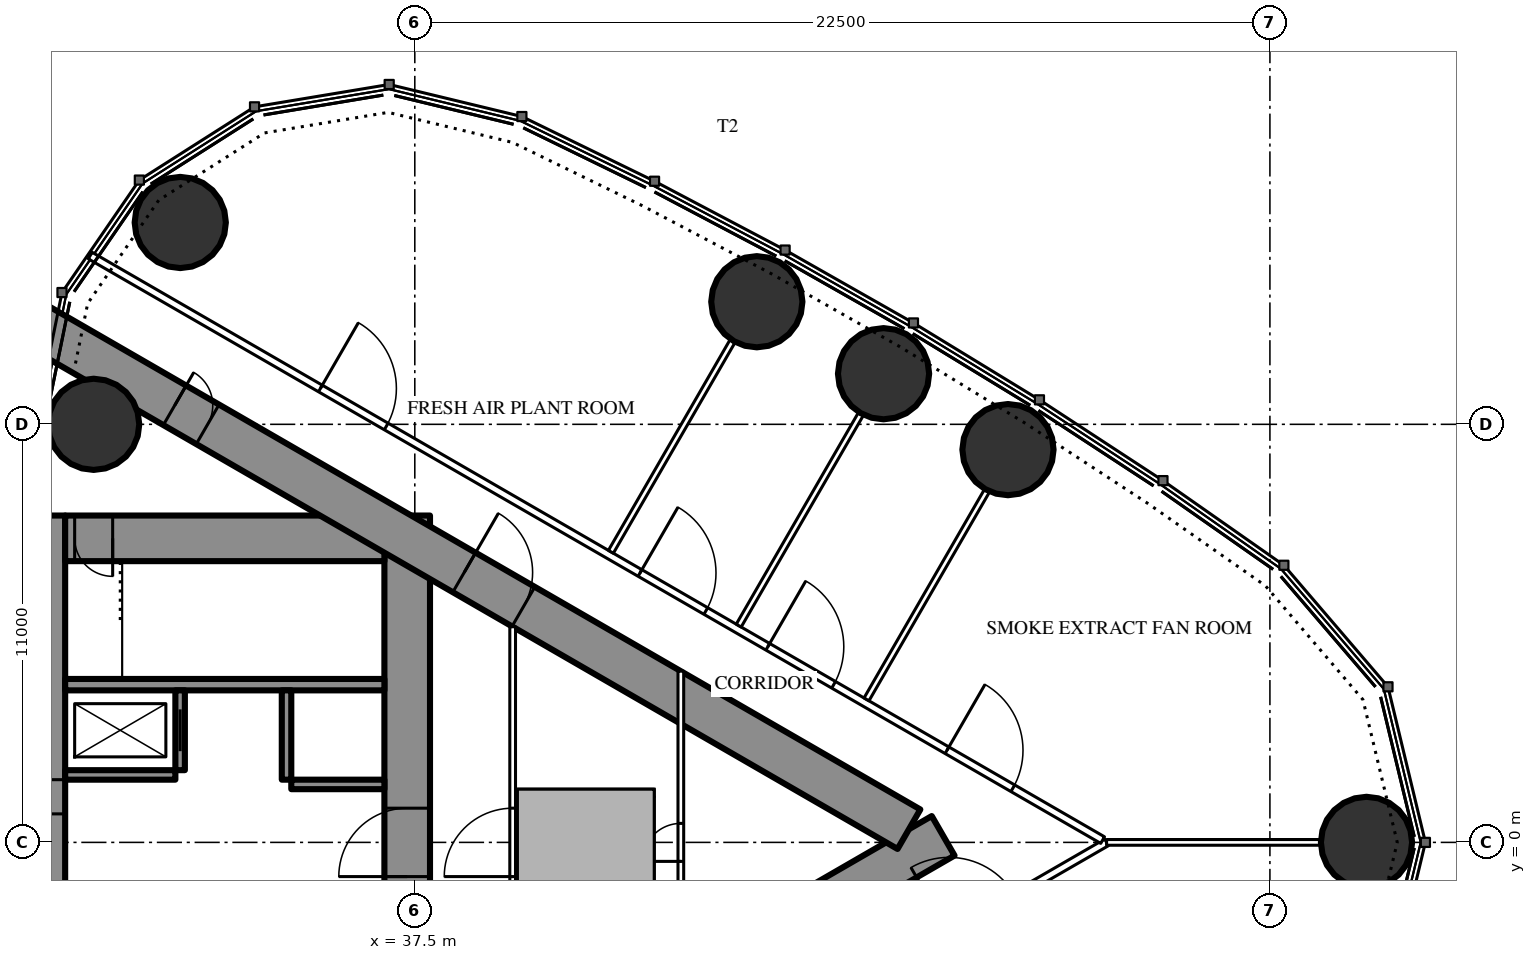
"""IFC4 building model, lengths in metres.
Left out: names, types, materials, properties, quantities, classifications, styles, units other than length and angle.
Written with IfcOpenShell. Run it as: python <this file> out.ifc"""

import sys

from ifc_helpers import new_model, si_unit, direction, frame, frame_2d, origin, origin_2d, place, context, subcontext, project, spatial, rectangle, circle, extrude, element, fill, save


model = new_model("IFC4")
c1 = context("Model", 3, precision=1e-05, world=origin(), true_north=direction((0.0, 1.0)))
c2 = subcontext(c1, "Body", "Model", "MODEL_VIEW")
j1 = project(units=[si_unit("LENGTHUNIT", "METRE"), si_unit("PLANEANGLEUNIT", "RADIAN")], contexts=[c1])
p1 = place(None, origin())
s1 = spatial("IfcSite", under=j1, at=p1, CompositionType="ELEMENT")
p2 = place(p1, origin())
s2 = spatial("IfcBuilding", under=s1, at=p2, CompositionType="ELEMENT")
p3 = place(p2, frame((0.0, 0.0, 268.3)))
s3 = spatial("IfcBuildingStorey", under=s2, at=p3, CompositionType="ELEMENT", Elevation=268.3)
for number, where, z_axis, x_axis in (
    (1, (62.542, 0.0, 0.0), (0.0, 0.0, 1.0), (1.0, 0.0, 0.0)),
    (2, (31.328, 16.311, 0.0), (0.0, 0.0, 1.0), (1.0, 0.0, 0.0)),
    (3, (29.05, 11.0, 0.0), (0.0, 0.0, 1.0), (1.0, 0.0, 0.0)),
    (4, (53.108, 10.334, 0.0), (0.0, 0.0, 1.0), (1.0, 0.0, 0.0)),
    (5, (49.834, 12.332, 0.0), (0.0, 0.0, 1.0), (1.0, 0.0, 0.0)),
    (6, (46.499, 14.226, 0.0), (0.0, 0.0, 1.0), (1.0, 0.0, 0.0)),
):
    element("IfcColumn", number, at=place(p3, frame(where, z_axis=z_axis, x_axis=x_axis)), inside=s3, PredefinedType="COLUMN", context=c2, shape_type="SweptSolid", body=[
        extrude(circle(Radius=1.2, at=origin_2d()), origin(), (0.0, 0.0, 1.0), 5.0),
    ])
p4 = place(p3, frame((27.9, -8.6, 0.0), z_axis=(0.0, 0.0, 1.0), x_axis=(0.0, 1.0, 0.0)))
e7 = element("IfcWall", 7, at=p4, inside=s3, PredefinedType="SHEAR", context=c2, shape_type="SweptSolid", body=[
    extrude(rectangle(XDim=17.2, YDim=0.8, at=frame_2d((8.6, 0.0))), origin(), (0.0, 0.0, 1.0), 5.0),
])
p5 = place(p4, frame((9.35, 0.0, 0.0)))
e8 = element("IfcOpeningElement", 8, at=p5, cuts=e7, PredefinedType="OPENING", context=c2, shape_type="SweptSolid", body=[
    extrude(rectangle(XDim=0.9, YDim=2.2, at=frame_2d((0.45, 1.1))), frame((0.0, 0.41, 0.0), z_axis=(0.0, -1.0, 0.0), x_axis=(1.0, 0.0, 0.0)), (0.0, 0.0, 1.0), 0.82),
])
p6 = place(p3, frame((37.3, -8.6, 0.0), z_axis=(0.0, 0.0, 1.0), x_axis=(0.0, 1.0, 0.0)))
e9 = element("IfcWall", 9, at=p6, inside=s3, PredefinedType="SHEAR", context=c2, shape_type="SweptSolid", body=[
    extrude(rectangle(XDim=17.2, YDim=1.2, at=frame_2d((8.6, 0.0))), origin(), (0.0, 0.0, 1.0), 5.0),
])
p7 = place(p6, frame((7.7, 0.0, 0.0)))
e10 = element("IfcOpeningElement", 10, at=p7, cuts=e9, PredefinedType="OPENING", context=c2, shape_type="SweptSolid", body=[
    extrude(rectangle(XDim=1.8, YDim=2.2, at=frame_2d((0.9, 1.1))), frame((0.0, 0.61, 0.0), z_axis=(0.0, -1.0, 0.0), x_axis=(1.0, 0.0, 0.0)), (0.0, 0.0, 1.0), 1.22),
])
p8 = place(p3, frame((28.3, 8.0, 0.0), z_axis=(0.0, 0.0, 1.0), x_axis=(1.0, 0.0, 0.0)))
e11 = element("IfcWall", 11, at=p8, inside=s3, PredefinedType="SHEAR", context=c2, shape_type="SweptSolid", body=[
    extrude(rectangle(XDim=8.4, YDim=1.2, at=frame_2d((4.2, 0.0))), origin(), (0.0, 0.0, 1.0), 5.0),
])
p9 = place(p8, frame((0.25, 0.0, 0.0)))
e12 = element("IfcOpeningElement", 12, at=p9, cuts=e11, PredefinedType="OPENING", context=c2, shape_type="SweptSolid", body=[
    extrude(rectangle(XDim=1.0, YDim=2.2, at=frame_2d((0.5, 1.1))), frame((0.0, 0.61, 0.0), z_axis=(0.0, -1.0, 0.0), x_axis=(1.0, 0.0, 0.0)), (0.0, 0.0, 1.0), 1.22),
])
p10 = place(p3, frame((28.3, 4.15, 0.0), z_axis=(0.0, 0.0, 1.0), x_axis=(1.0, 0.0, 0.0)))
e13 = element("IfcWall", 13, at=p10, inside=s3, PredefinedType="SHEAR", context=c2, shape_type="SweptSolid", body=[
    extrude(rectangle(XDim=8.4, YDim=0.3, at=frame_2d((4.2, 0.0))), origin(), (0.0, 0.0, 1.0), 5.0),
])
p11 = place(p3, frame((31.325, 1.9, 0.0), z_axis=(0.0, 0.0, 1.0), x_axis=(0.0, 1.0, 0.0)))
e14 = element("IfcWall", 14, at=p11, inside=s3, PredefinedType="SHEAR", context=c2, shape_type="SweptSolid", body=[
    extrude(rectangle(XDim=2.1, YDim=0.25, at=frame_2d((1.05, 0.0))), origin(), (0.0, 0.0, 1.0), 5.0),
])
p12 = place(p11, frame((0.5, 0.0, 0.0)))
e15 = element("IfcOpeningElement", 15, at=p12, cuts=e14, PredefinedType="OPENING", context=c2, shape_type="SweptSolid", body=[
    extrude(rectangle(XDim=1.1, YDim=2.2, at=frame_2d((0.55, 1.1))), frame((0.0, 0.135, 0.0), z_axis=(0.0, -1.0, 0.0), x_axis=(1.0, 0.0, 0.0)), (0.0, 0.0, 1.0), 0.27),
])
p13 = place(p3, frame((34.125, 1.65, 0.0), z_axis=(0.0, 0.0, 1.0), x_axis=(0.0, 1.0, 0.0)))
e16 = element("IfcWall", 16, at=p13, inside=s3, PredefinedType="SHEAR", context=c2, shape_type="SweptSolid", body=[
    extrude(rectangle(XDim=2.35, YDim=0.25, at=frame_2d((1.175, 0.0))), origin(), (0.0, 0.0, 1.0), 5.0),
])
p14 = place(p3, frame((28.3, 1.775, 0.0), z_axis=(0.0, 0.0, 1.0), x_axis=(1.0, 0.0, 0.0)))
e17 = element("IfcWall", 17, at=p14, inside=s3, PredefinedType="SHEAR", context=c2, shape_type="SweptSolid", body=[
    extrude(rectangle(XDim=2.9, YDim=0.25, at=frame_2d((1.45, 0.0))), origin(), (0.0, 0.0, 1.0), 5.0),
])
p15 = place(p3, frame((34.25, 1.525, 0.0), z_axis=(0.0, 0.0, 1.0), x_axis=(1.0, 0.0, 0.0)))
e18 = element("IfcWall", 18, at=p15, inside=s3, PredefinedType="SHEAR", context=c2, shape_type="SweptSolid", body=[
    extrude(rectangle(XDim=2.45, YDim=0.25, at=frame_2d((1.225, 0.0))), origin(), (0.0, 0.0, 1.0), 5.0),
])
p16 = place(p3, frame((27.2, -13.8, 0.0), z_axis=(0.0, 0.0, 1.0), x_axis=(0.866027159892, 0.499996958321, 0.0)))
e19 = element("IfcWall", 19, at=p16, inside=s3, PredefinedType="SHEAR", context=c2, shape_type="SweptSolid", body=[
    extrude(rectangle(XDim=27.947, YDim=1.2, at=frame_2d((13.973, 0.0))), origin(), (0.0, 0.0, 1.0), 5.0),
])
p17 = place(p16, frame((4.6, 0.0, 0.0)))
e20 = element("IfcOpeningElement", 20, at=p17, cuts=e19, PredefinedType="OPENING", context=c2, shape_type="SweptSolid", body=[
    extrude(rectangle(XDim=1.0, YDim=2.2, at=frame_2d((0.5, 1.1))), frame((0.0, 0.61, 0.0), z_axis=(0.0, -1.0, 0.0), x_axis=(1.0, 0.0, 0.0)), (0.0, 0.0, 1.0), 1.22),
])
p18 = place(p16, frame((13.395, 0.0, 0.0)))
e21 = element("IfcOpeningElement", 21, at=p18, cuts=e19, PredefinedType="OPENING", context=c2, shape_type="SweptSolid", body=[
    extrude(rectangle(XDim=1.8, YDim=2.2, at=frame_2d((0.9, 1.1))), frame((0.0, 0.61, 0.0), z_axis=(0.0, -1.0, 0.0), x_axis=(1.0, 0.0, 0.0)), (0.0, 0.0, 1.0), 1.22),
])
p19 = place(p3, frame((27.2, 13.8, 0.0), z_axis=(0.0, 0.0, 1.0), x_axis=(0.866024515034, -0.500001539357, 0.0)))
e22 = element("IfcWall", 22, at=p19, inside=s3, PredefinedType="SHEAR", context=c2, shape_type="SweptSolid", body=[
    extrude(rectangle(XDim=26.907, YDim=1.2, at=frame_2d((13.454, 0.0))), origin(), (0.0, 0.0, 1.0), 5.0),
])
p20 = place(p19, frame((4.6, 0.0, 0.0)))
e23 = element("IfcOpeningElement", 23, at=p20, cuts=e22, PredefinedType="OPENING", context=c2, shape_type="SweptSolid", body=[
    extrude(rectangle(XDim=1.0, YDim=2.2, at=frame_2d((0.5, 1.1))), frame((0.0, 0.61, 0.0), z_axis=(0.0, -1.0, 0.0), x_axis=(1.0, 0.0, 0.0)), (0.0, 0.0, 1.0), 1.22),
])
p21 = place(p19, frame((13.395, 0.0, 0.0)))
e24 = element("IfcOpeningElement", 24, at=p21, cuts=e22, PredefinedType="OPENING", context=c2, shape_type="SweptSolid", body=[
    extrude(rectangle(XDim=1.8, YDim=2.2, at=frame_2d((0.9, 1.1))), frame((0.0, 0.61, 0.0), z_axis=(0.0, -1.0, 0.0), x_axis=(1.0, 0.0, 0.0)), (0.0, 0.0, 1.0), 1.22),
])
p22 = place(p3, frame((43.8, 1.3, 5.0), z_axis=(0.0, 0.0, 1.0), x_axis=(-1.0, 0.0, 0.0)))
e25 = element("IfcWall", 25, at=p22, inside=s3, PredefinedType="SOLIDWALL", context=c2, shape_type="SweptSolid", body=[
    extrude(rectangle(XDim=3.6, YDim=0.2, at=frame_2d((1.8, 0.0))), origin(), (0.0, 0.0, 1.0), 2.6),
])
p23 = place(p3, frame((40.3, 1.2, 5.0), z_axis=(0.0, 0.0, 1.0), x_axis=(0.0, -1.0, 0.0)))
e26 = element("IfcWall", 26, at=p23, inside=s3, PredefinedType="SOLIDWALL", context=c2, shape_type="SweptSolid", body=[
    extrude(rectangle(XDim=2.4, YDim=0.2, at=frame_2d((1.2, 0.0))), origin(), (0.0, 0.0, 1.0), 2.6),
])
p24 = place(p23, frame((0.7, 0.0, 0.0)))
e27 = element("IfcOpeningElement", 27, at=p24, cuts=e26, PredefinedType="OPENING", context=c2, shape_type="SweptSolid", body=[
    extrude(rectangle(XDim=1.0, YDim=2.2, at=frame_2d((0.5, 1.1))), frame((0.0, 0.11, 0.0), z_axis=(0.0, -1.0, 0.0), x_axis=(1.0, 0.0, 0.0)), (0.0, 0.0, 1.0), 0.22),
])
p25 = place(p3, frame((43.7, -1.2, 5.0), z_axis=(0.0, 0.0, 1.0), x_axis=(0.0, 1.0, 0.0)))
e28 = element("IfcWall", 28, at=p25, inside=s3, PredefinedType="SOLIDWALL", context=c2, shape_type="SweptSolid", body=[
    extrude(rectangle(XDim=2.4, YDim=0.2, at=frame_2d((1.2, 0.0))), origin(), (0.0, 0.0, 1.0), 2.6),
])
p26 = place(p3, frame((28.959, -15.44, 0.0), z_axis=(0.0, 0.0, 1.0), x_axis=(0.866025227435, 0.500000305447, 0.0)))
e29 = element("IfcWall", 29, at=p26, inside=s3, PredefinedType="PARTITIONING", context=c2, shape_type="SweptSolid", body=[
    extrude(rectangle(XDim=30.88, YDim=0.2, at=frame_2d((15.44, 0.0))), origin(), (0.0, 0.0, 1.0), 4.7),
])
p27 = place(p26, frame((6.994, 0.0, 0.0)))
e30 = element("IfcOpeningElement", 30, at=p27, cuts=e29, PredefinedType="OPENING", context=c2, shape_type="SweptSolid", body=[
    extrude(rectangle(XDim=2.0, YDim=2.4, at=frame_2d((1.0, 1.2))), frame((0.0, 0.11, 0.0), z_axis=(0.0, -1.0, 0.0), x_axis=(1.0, 0.0, 0.0)), (0.0, 0.0, 1.0), 0.22),
])
p28 = place(p26, frame((16.704, 0.0, 0.0)))
e31 = element("IfcOpeningElement", 31, at=p28, cuts=e29, PredefinedType="OPENING", context=c2, shape_type="SweptSolid", body=[
    extrude(rectangle(XDim=2.0, YDim=2.4, at=frame_2d((1.0, 1.2))), frame((0.0, 0.11, 0.0), z_axis=(0.0, -1.0, 0.0), x_axis=(1.0, 0.0, 0.0)), (0.0, 0.0, 1.0), 0.22),
])
p29 = place(p26, frame((20.587, 0.0, 0.0)))
e32 = element("IfcOpeningElement", 32, at=p29, cuts=e29, PredefinedType="OPENING", context=c2, shape_type="SweptSolid", body=[
    extrude(rectangle(XDim=2.0, YDim=2.4, at=frame_2d((1.0, 1.2))), frame((0.0, 0.11, 0.0), z_axis=(0.0, -1.0, 0.0), x_axis=(1.0, 0.0, 0.0)), (0.0, 0.0, 1.0), 0.22),
])
p30 = place(p26, frame((26.092, 0.0, 0.0)))
e33 = element("IfcOpeningElement", 33, at=p30, cuts=e29, PredefinedType="OPENING", context=c2, shape_type="SweptSolid", body=[
    extrude(rectangle(XDim=2.0, YDim=2.4, at=frame_2d((1.0, 1.2))), frame((0.0, 0.11, 0.0), z_axis=(0.0, -1.0, 0.0), x_axis=(1.0, 0.0, 0.0)), (0.0, 0.0, 1.0), 0.22),
])
p31 = place(p3, frame((28.959, 15.44, 0.0), z_axis=(0.0, 0.0, 1.0), x_axis=(0.866027378611, -0.499996579484, 0.0)))
e34 = element("IfcWall", 34, at=p31, inside=s3, PredefinedType="PARTITIONING", context=c2, shape_type="SweptSolid", body=[
    extrude(rectangle(XDim=30.76, YDim=0.2, at=frame_2d((15.38, 0.0))), origin(), (0.0, 0.0, 1.0), 4.7),
])
p32 = place(p31, frame((26.032, 0.0, 0.0)))
e35 = element("IfcOpeningElement", 35, at=p32, cuts=e34, PredefinedType="OPENING", context=c2, shape_type="SweptSolid", body=[
    extrude(rectangle(XDim=2.0, YDim=2.4, at=frame_2d((1.0, 1.2))), frame((0.0, 0.11, 0.0), z_axis=(0.0, -1.0, 0.0), x_axis=(1.0, 0.0, 0.0)), (0.0, 0.0, 1.0), 0.22),
])
p33 = place(p31, frame((20.587, 0.0, 0.0)))
e36 = element("IfcOpeningElement", 36, at=p33, cuts=e34, PredefinedType="OPENING", context=c2, shape_type="SweptSolid", body=[
    extrude(rectangle(XDim=2.0, YDim=2.4, at=frame_2d((1.0, 1.2))), frame((0.0, 0.11, 0.0), z_axis=(0.0, -1.0, 0.0), x_axis=(1.0, 0.0, 0.0)), (0.0, 0.0, 1.0), 0.22),
])
p34 = place(p31, frame((16.704, 0.0, 0.0)))
e37 = element("IfcOpeningElement", 37, at=p34, cuts=e34, PredefinedType="OPENING", context=c2, shape_type="SweptSolid", body=[
    extrude(rectangle(XDim=2.0, YDim=2.4, at=frame_2d((1.0, 1.2))), frame((0.0, 0.11, 0.0), z_axis=(0.0, -1.0, 0.0), x_axis=(1.0, 0.0, 0.0)), (0.0, 0.0, 1.0), 0.22),
])
p35 = place(p31, frame((6.994, 0.0, 0.0)))
e38 = element("IfcOpeningElement", 38, at=p35, cuts=e34, PredefinedType="OPENING", context=c2, shape_type="SweptSolid", body=[
    extrude(rectangle(XDim=2.0, YDim=2.4, at=frame_2d((1.0, 1.2))), frame((0.0, 0.11, 0.0), z_axis=(0.0, -1.0, 0.0), x_axis=(1.0, 0.0, 0.0)), (0.0, 0.0, 1.0), 0.22),
])
p36 = place(p3, frame((42.66, 7.646, 0.0), z_axis=(0.0, 0.0, 1.0), x_axis=(0.499996592859, 0.866027370889, 0.0)))
e39 = element("IfcWall", 39, at=p36, inside=s3, PredefinedType="PARTITIONING", context=c2, shape_type="SweptSolid", body=[
    extrude(rectangle(XDim=6.398, YDim=0.15, at=frame_2d((3.199, 0.0))), origin(), (0.0, 0.0, 1.0), 3.8),
])
p37 = place(p3, frame((46.023, 5.704, 0.0), z_axis=(0.0, 0.0, 1.0), x_axis=(0.499984478165, 0.866034365135, 0.0)))
e40 = element("IfcWall", 40, at=p37, inside=s3, PredefinedType="PARTITIONING", context=c2, shape_type="SweptSolid", body=[
    extrude(rectangle(XDim=6.426, YDim=0.15, at=frame_2d((3.213, 0.0))), origin(), (0.0, 0.0, 1.0), 3.8),
])
p38 = place(p3, frame((49.385, 3.763, 0.0), z_axis=(0.0, 0.0, 1.0), x_axis=(0.499999447814, 0.866025722589, 0.0)))
e41 = element("IfcWall", 41, at=p38, inside=s3, PredefinedType="PARTITIONING", context=c2, shape_type="SweptSolid", body=[
    extrude(rectangle(XDim=6.333, YDim=0.15, at=frame_2d((3.166, 0.0))), origin(), (0.0, 0.0, 1.0), 3.8),
])
p39 = place(p3, frame((55.702, 0.0, 0.0), z_axis=(0.0, 0.0, 1.0), x_axis=(1.0, 0.0, 0.0)))
e42 = element("IfcWall", 42, at=p39, inside=s3, PredefinedType="PARTITIONING", context=c2, shape_type="SweptSolid", body=[
    extrude(rectangle(XDim=5.619, YDim=0.15, at=frame_2d((2.81, 0.0))), origin(), (0.0, 0.0, 1.0), 3.8),
])
p40 = place(p3, frame((40.075, -5.674, 0.0), z_axis=(0.0, 0.0, 1.0), x_axis=(0.0, 1.0, 0.0)))
e43 = element("IfcWall", 43, at=p40, inside=s3, PredefinedType="PARTITIONING", context=c2, shape_type="SweptSolid", body=[
    extrude(rectangle(XDim=11.348, YDim=0.15, at=frame_2d((5.674, 0.0))), origin(), (0.0, 0.0, 1.0), 4.7),
])
p41 = place(p40, frame((4.774, 0.0, 0.0)))
e44 = element("IfcOpeningElement", 44, at=p41, cuts=e43, PredefinedType="OPENING", context=c2, shape_type="SweptSolid", body=[
    extrude(rectangle(XDim=1.8, YDim=2.2, at=frame_2d((0.9, 1.1))), frame((0.0, 0.085, 0.0), z_axis=(0.0, -1.0, 0.0), x_axis=(1.0, 0.0, 0.0)), (0.0, 0.0, 1.0), 0.17),
])
p42 = place(p3, frame((44.5, -4.505, 0.0), z_axis=(0.0, 0.0, 1.0), x_axis=(0.0, 1.0, 0.0)))
e45 = element("IfcWall", 45, at=p42, inside=s3, PredefinedType="PARTITIONING", context=c2, shape_type="SweptSolid", body=[
    extrude(rectangle(XDim=9.009, YDim=0.15, at=frame_2d((4.505, 0.0))), origin(), (0.0, 0.0, 1.0), 4.7),
])
p43 = place(p42, frame((4.005, 0.0, 0.0)))
e46 = element("IfcOpeningElement", 46, at=p43, cuts=e45, PredefinedType="OPENING", context=c2, shape_type="SweptSolid", body=[
    extrude(rectangle(XDim=1.0, YDim=2.2, at=frame_2d((0.5, 1.1))), frame((0.0, 0.085, 0.0), z_axis=(0.0, -1.0, 0.0), x_axis=(1.0, 0.0, 0.0)), (0.0, 0.0, 1.0), 0.17),
])
p44 = place(p24, origin())
e47 = element("IfcDoor", 47, at=p44, inside=s3, OperationType="SINGLE_SWING_LEFT", PredefinedType="DOOR", context=c2, shape_type="SweptSolid", body=[
    extrude(rectangle(XDim=1.0, YDim=2.2, at=frame_2d((0.5, 1.1))), frame((0.0, 0.025, 0.0), z_axis=(0.0, -1.0, 0.0), x_axis=(1.0, 0.0, 0.0)), (0.0, 0.0, 1.0), 0.05),
])
fill(e27, e47)
p45 = place(p32, origin())
e48 = element("IfcDoor", 48, at=p45, inside=s3, OperationType="DOUBLE_DOOR_SINGLE_SWING", PredefinedType="DOOR", context=c2, shape_type="SweptSolid", body=[
    extrude(rectangle(XDim=2.0, YDim=2.4, at=frame_2d((1.0, 1.2))), frame((0.0, 0.025, 0.0), z_axis=(0.0, -1.0, 0.0), x_axis=(1.0, 0.0, 0.0)), (0.0, 0.0, 1.0), 0.05),
])
fill(e35, e48)
p46 = place(p33, origin())
e49 = element("IfcDoor", 49, at=p46, inside=s3, OperationType="DOUBLE_DOOR_SINGLE_SWING", PredefinedType="DOOR", context=c2, shape_type="SweptSolid", body=[
    extrude(rectangle(XDim=2.0, YDim=2.4, at=frame_2d((1.0, 1.2))), frame((0.0, 0.025, 0.0), z_axis=(0.0, -1.0, 0.0), x_axis=(1.0, 0.0, 0.0)), (0.0, 0.0, 1.0), 0.05),
])
fill(e36, e49)
p47 = place(p34, origin())
e50 = element("IfcDoor", 50, at=p47, inside=s3, OperationType="DOUBLE_DOOR_SINGLE_SWING", PredefinedType="DOOR", context=c2, shape_type="SweptSolid", body=[
    extrude(rectangle(XDim=2.0, YDim=2.4, at=frame_2d((1.0, 1.2))), frame((0.0, 0.025, 0.0), z_axis=(0.0, -1.0, 0.0), x_axis=(1.0, 0.0, 0.0)), (0.0, 0.0, 1.0), 0.05),
])
fill(e37, e50)
p48 = place(p35, origin())
e51 = element("IfcDoor", 51, at=p48, inside=s3, OperationType="DOUBLE_DOOR_SINGLE_SWING", PredefinedType="DOOR", context=c2, shape_type="SweptSolid", body=[
    extrude(rectangle(XDim=2.0, YDim=2.4, at=frame_2d((1.0, 1.2))), frame((0.0, 0.025, 0.0), z_axis=(0.0, -1.0, 0.0), x_axis=(1.0, 0.0, 0.0)), (0.0, 0.0, 1.0), 0.05),
])
fill(e38, e51)
p49 = place(p41, origin())
e52 = element("IfcDoor", 52, at=p49, inside=s3, OperationType="DOUBLE_DOOR_SINGLE_SWING", PredefinedType="DOOR", context=c2, shape_type="SweptSolid", body=[
    extrude(rectangle(XDim=1.8, YDim=2.2, at=frame_2d((0.9, 1.1))), frame((0.0, 0.025, 0.0), z_axis=(0.0, -1.0, 0.0), x_axis=(1.0, 0.0, 0.0)), (0.0, 0.0, 1.0), 0.05),
])
fill(e44, e52)
p50 = place(p43, origin())
e53 = element("IfcDoor", 53, at=p50, inside=s3, OperationType="SINGLE_SWING_LEFT", PredefinedType="DOOR", context=c2, shape_type="SweptSolid", body=[
    extrude(rectangle(XDim=1.0, YDim=2.2, at=frame_2d((0.5, 1.1))), frame((0.0, 0.025, 0.0), z_axis=(0.0, -1.0, 0.0), x_axis=(1.0, 0.0, 0.0)), (0.0, 0.0, 1.0), 0.05),
])
fill(e46, e53)
p51 = place(p20, origin())
e54 = element("IfcDoor", 54, at=p51, inside=s3, OperationType="SINGLE_SWING_LEFT", PredefinedType="DOOR", context=c2, shape_type="SweptSolid", body=[
    extrude(rectangle(XDim=1.0, YDim=2.2, at=frame_2d((0.5, 1.1))), frame((0.0, 0.025, 0.0), z_axis=(0.0, -1.0, 0.0), x_axis=(1.0, 0.0, 0.0)), (0.0, 0.0, 1.0), 0.05),
])
fill(e23, e54)
p52 = place(p21, origin())
e55 = element("IfcDoor", 55, at=p52, inside=s3, OperationType="DOUBLE_DOOR_SINGLE_SWING", PredefinedType="DOOR", context=c2, shape_type="SweptSolid", body=[
    extrude(rectangle(XDim=1.8, YDim=2.2, at=frame_2d((0.9, 1.1))), frame((0.0, 0.025, 0.0), z_axis=(0.0, -1.0, 0.0), x_axis=(1.0, 0.0, 0.0)), (0.0, 0.0, 1.0), 0.05),
])
fill(e24, e55)
p53 = place(p7, origin())
e56 = element("IfcDoor", 56, at=p53, inside=s3, OperationType="DOUBLE_DOOR_SINGLE_SWING", PredefinedType="DOOR", context=c2, shape_type="SweptSolid", body=[
    extrude(rectangle(XDim=1.8, YDim=2.2, at=frame_2d((0.9, 1.1))), frame((0.0, 0.025, 0.0), z_axis=(0.0, -1.0, 0.0), x_axis=(1.0, 0.0, 0.0)), (0.0, 0.0, 1.0), 0.05),
])
fill(e10, e56)
p54 = place(p9, origin())
e57 = element("IfcDoor", 57, at=p54, inside=s3, OperationType="SINGLE_SWING_RIGHT", PredefinedType="DOOR", context=c2, shape_type="SweptSolid", body=[
    extrude(rectangle(XDim=1.0, YDim=2.2, at=frame_2d((0.5, 1.1))), frame((0.0, 0.025, 0.0), z_axis=(0.0, -1.0, 0.0), x_axis=(1.0, 0.0, 0.0)), (0.0, 0.0, 1.0), 0.05),
])
fill(e12, e57)
p55 = place(p12, origin())
e58 = element("IfcDoor", 58, at=p55, inside=s3, OperationType="SLIDING_TO_LEFT", PredefinedType="USERDEFINED", context=c2, shape_type="SweptSolid", body=[
    extrude(rectangle(XDim=1.1, YDim=2.2, at=frame_2d((0.55, 1.1))), frame((0.0, 0.025, 0.0), z_axis=(0.0, -1.0, 0.0), x_axis=(1.0, 0.0, 0.0)), (0.0, 0.0, 1.0), 0.05),
])
fill(e15, e58)
save(model, sys.argv[1])
